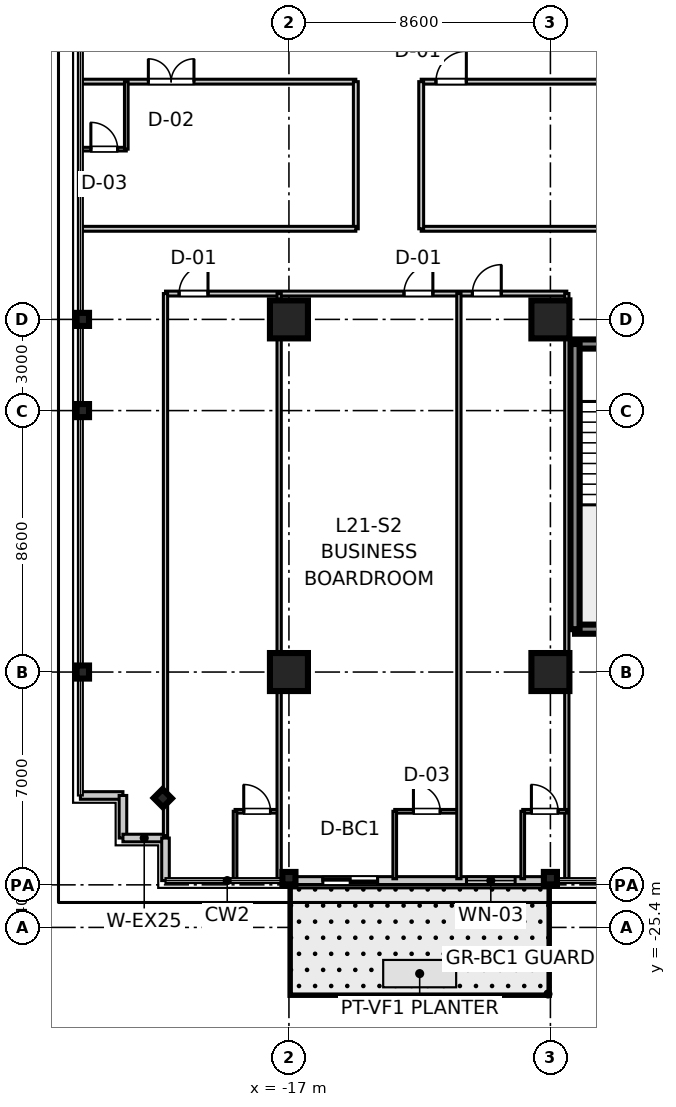
"""IFC4 building model, lengths in metres.
Left out: names, types, materials, properties, quantities, classifications, styles, units other than length and angle.
Written with IfcOpenShell. Run it as: python <this file> out.ifc"""

import sys

from ifc_helpers import new_model, si_unit, direction, frame, frame_2d, origin, origin_2d, place, context, subcontext, project, spatial, rectangle, i_section, extrude, source, transform, mapped, element, fill, save


model = new_model("IFC4")
c1 = context("Model", 3, precision=1e-05, world=origin(), true_north=direction((0.0, 1.0)))
c2 = subcontext(c1, "Body", "Model", "MODEL_VIEW")
j1 = project(units=[si_unit("LENGTHUNIT", "METRE"), si_unit("PLANEANGLEUNIT", "RADIAN")], contexts=[c1])
p1 = place(None, origin())
s1 = spatial("IfcSite", under=j1, at=p1, CompositionType="ELEMENT")
p2 = place(p1, origin())
s2 = spatial("IfcBuilding", under=s1, at=p2, CompositionType="ELEMENT")
p3 = place(p2, frame((0.0, 0.0, 88.3)))
s3 = spatial("IfcBuildingStorey", under=s2, at=p3, CompositionType="ELEMENT", Elevation=88.3)
m1 = source(origin(), c2, "Body", "SweptSolid", [
    extrude(rectangle(XDim=1.25, YDim=1.25, at=origin_2d()), origin(), (0.0, 0.0, 1.0), 3.605),
])
for number, where, z_axis, x_axis in (
    (1, (-17.0, -17.0, 0.0), (0.0, 0.0, 1.0), (1.0, 0.0, 0.0)),
    (2, (-17.0, -5.4, 0.0), (0.0, 0.0, 1.0), (1.0, 0.0, 0.0)),
    (3, (-8.4, -17.0, 0.0), (0.0, 0.0, 1.0), (1.0, 0.0, 0.0)),
    (4, (-8.4, -5.4, 0.0), (0.0, 0.0, 1.0), (1.0, 0.0, 0.0)),
):
    element("IfcColumn", number, at=place(p3, frame(where, z_axis=z_axis, x_axis=x_axis)), inside=s3, PredefinedType="COLUMN", context=c2, shape_type="MappedRepresentation", body=[
        mapped(m1, transform((0.0, 0.0, 0.0), scale=1.0)),
    ])
m2 = source(origin(), c2, "Body", "SweptSolid", [
    extrude(i_section(OverallWidth=0.409, OverallDepth=0.43, WebThickness=0.021, FlangeThickness=0.034, at=origin_2d()), origin(), (0.0, 0.0, 1.0), 3.605),
])
for number, where, z_axis, x_axis in (
    (5, (-23.78, -17.0, 0.0), (0.0, 0.0, 1.0), (1.0, 0.0, 0.0)),
    (6, (-23.78, -8.4, 0.0), (0.0, 0.0, 1.0), (1.0, 0.0, 0.0)),
    (7, (-23.78, -5.4, 0.0), (0.0, 0.0, 1.0), (1.0, 0.0, 0.0)),
    (8, (-17.0, -23.78, 0.0), (0.0, 0.0, 1.0), (0.0, 1.0, 0.0)),
    (9, (-8.4, -23.78, 0.0), (0.0, 0.0, 1.0), (0.0, 1.0, 0.0)),
    (10, (-21.15, -21.15, 0.0), (0.0, 0.0, 1.0), (0.707, 0.707, 0.0)),
):
    element("IfcColumn", number, at=place(p3, frame(where, z_axis=z_axis, x_axis=x_axis)), inside=s3, PredefinedType="COLUMN", context=c2, shape_type="MappedRepresentation", body=[
        mapped(m2, transform((0.0, 0.0, 0.0), scale=1.0)),
    ])
m3 = source(origin(), c2, "Body", "SweptSolid", [
    extrude(rectangle(XDim=3.98, YDim=0.3, at=frame_2d((1.99, 0.0))), origin(), (0.0, 0.0, 1.0), 3.38),
])
p4 = place(p3, frame((-7.59, -15.59, 0.0), z_axis=(0.0, 0.0, 1.0), x_axis=(1.0, 0.0, 0.0)))
e11 = element("IfcWall", 11, at=p4, inside=s3, PredefinedType="SHEAR", context=c2, shape_type="MappedRepresentation", body=[
    mapped(m3, transform((0.0, 0.0, 0.0), scale=1.0)),
])
p5 = place(p3, frame((-7.59, -6.21, 0.0), z_axis=(0.0, 0.0, 1.0), x_axis=(1.0, 0.0, 0.0)))
e12 = element("IfcWall", 12, at=p5, inside=s3, PredefinedType="SHEAR", context=c2, shape_type="MappedRepresentation", body=[
    mapped(m3, transform((0.0, 0.0, 0.0), scale=1.0)),
])
p6 = place(p5, frame((1.44, 0.0, 0.0)))
e13 = element("IfcOpeningElement", 13, at=p6, cuts=e12, PredefinedType="OPENING", context=c2, shape_type="SweptSolid", body=[
    extrude(rectangle(XDim=1.1, YDim=2.15, at=frame_2d((0.55, 1.075))), frame((0.0, 0.16, 0.0), z_axis=(0.0, -1.0, 0.0), x_axis=(1.0, 0.0, 0.0)), (0.0, 0.0, 1.0), 0.32),
])
m4 = source(origin(), c2, "Body", "SweptSolid", [
    extrude(rectangle(XDim=9.38, YDim=0.3, at=frame_2d((4.69, 0.0))), origin(), (0.0, 0.0, 1.0), 3.38),
])
p7 = place(p3, frame((-7.59, -15.59, 0.0), z_axis=(0.0, 0.0, 1.0), x_axis=(0.0, 1.0, 0.0)))
e14 = element("IfcWall", 14, at=p7, inside=s3, PredefinedType="SHEAR", context=c2, shape_type="MappedRepresentation", body=[
    mapped(m4, transform((0.0, 0.0, 0.0), scale=1.0)),
])
m5 = source(origin(), c2, "Body", "SweptSolid", [
    extrude(rectangle(XDim=1.4, YDim=0.25, at=frame_2d((0.7, 0.0))), origin(), (0.0, 0.0, 1.0), 3.38),
])
p8 = place(p3, frame((-23.86, -21.06, 0.0), z_axis=(0.0, 0.0, 1.0), x_axis=(1.0, 0.0, 0.0)))
e15 = element("IfcWall", 15, at=p8, inside=s3, PredefinedType="STANDARD", context=c2, shape_type="MappedRepresentation", body=[
    mapped(m5, transform((0.0, 0.0, 0.0), scale=1.0)),
])
m6 = source(origin(), c2, "Body", "SweptSolid", [
    extrude(rectangle(XDim=1.4, YDim=0.25, at=frame_2d((0.7, 0.0))), origin(), (0.0, 0.0, 1.0), 3.38),
])
for number, where, z_axis, x_axis in (
    (16, (-22.46, -22.46, 0.0), (0.0, 0.0, 1.0), (0.0, 1.0, 0.0)),
    (17, (-22.46, -22.46, 0.0), (0.0, 0.0, 1.0), (1.0, 0.0, 0.0)),
):
    element("IfcWall", number, at=place(p3, frame(where, z_axis=z_axis, x_axis=x_axis)), inside=s3, PredefinedType="STANDARD", context=c2, shape_type="MappedRepresentation", body=[
        mapped(m6, transform((0.0, 0.0, 0.0), scale=1.0)),
    ])
p9 = place(p3, frame((-21.06, -23.86, 0.0), z_axis=(0.0, 0.0, 1.0), x_axis=(0.0, 1.0, 0.0)))
e18 = element("IfcWall", 18, at=p9, inside=s3, PredefinedType="STANDARD", context=c2, shape_type="MappedRepresentation", body=[
    mapped(m5, transform((0.0, 0.0, 0.0), scale=1.0)),
])
m7 = source(origin(), c2, "Body", "SweptSolid", [
    extrude(rectangle(XDim=8.6, YDim=0.26, at=frame_2d((4.3, 0.0))), origin(), (0.0, 0.0, 1.0), 2.86),
])
p10 = place(p3, frame((-17.0, -23.86, 0.0), z_axis=(0.0, 0.0, 1.0), x_axis=(1.0, 0.0, 0.0)))
e19 = element("IfcWall", 19, at=p10, inside=s3, PredefinedType="STANDARD", context=c2, shape_type="MappedRepresentation", body=[
    mapped(m7, transform((0.0, 0.0, 0.0), scale=1.0)),
])
p11 = place(p10, frame((1.115, 0.0, 0.0)))
e20 = element("IfcOpeningElement", 20, at=p11, cuts=e19, PredefinedType="OPENING", context=c2, shape_type="SweptSolid", body=[
    extrude(rectangle(XDim=1.8, YDim=2.25, at=frame_2d((0.9, 1.125))), frame((0.0, 0.14, 0.0), z_axis=(0.0, -1.0, 0.0), x_axis=(1.0, 0.0, 0.0)), (0.0, 0.0, 1.0), 0.28),
])
p12 = place(p10, frame((5.84, 0.0, 0.85)))
e21 = element("IfcOpeningElement", 21, at=p12, cuts=e19, PredefinedType="OPENING", context=c2, shape_type="SweptSolid", body=[
    extrude(rectangle(XDim=1.6, YDim=1.8, at=frame_2d((0.8, 0.9))), frame((0.0, 0.14, 0.0), z_axis=(0.0, -1.0, 0.0), x_axis=(1.0, 0.0, 0.0)), (0.0, 0.0, 1.0), 0.28),
])
m8 = source(origin(), c2, "Body", "SweptSolid", [
    extrude(rectangle(XDim=13.2, YDim=0.16, at=frame_2d((6.6, 0.0))), origin(), (0.0, 0.0, 1.0), 2.72),
])
p13 = place(p3, frame((-21.06, -4.55, 0.0), z_axis=(0.0, 0.0, 1.0), x_axis=(1.0, 0.0, 0.0)))
e22 = element("IfcWall", 22, at=p13, inside=s3, PredefinedType="PARTITIONING", context=c2, shape_type="MappedRepresentation", body=[
    mapped(m8, transform((0.0, 0.0, 0.0), scale=1.0)),
])
p14 = place(p13, frame((0.448, 0.0, 0.0)))
e23 = element("IfcOpeningElement", 23, at=p14, cuts=e22, PredefinedType="OPENING", context=c2, shape_type="SweptSolid", body=[
    extrude(rectangle(XDim=0.95, YDim=2.1, at=frame_2d((0.475, 1.05))), frame((0.0, 0.09, 0.0), z_axis=(0.0, -1.0, 0.0), x_axis=(1.0, 0.0, 0.0)), (0.0, 0.0, 1.0), 0.18),
])
p15 = place(p13, frame((7.844, 0.0, 0.0)))
e24 = element("IfcOpeningElement", 24, at=p15, cuts=e22, PredefinedType="OPENING", context=c2, shape_type="SweptSolid", body=[
    extrude(rectangle(XDim=0.95, YDim=2.1, at=frame_2d((0.475, 1.05))), frame((0.0, 0.09, 0.0), z_axis=(0.0, -1.0, 0.0), x_axis=(1.0, 0.0, 0.0)), (0.0, 0.0, 1.0), 0.18),
])
p16 = place(p13, frame((10.094, 0.0, 0.0)))
e25 = element("IfcOpeningElement", 25, at=p16, cuts=e22, PredefinedType="OPENING", context=c2, shape_type="SweptSolid", body=[
    extrude(rectangle(XDim=0.95, YDim=2.1, at=frame_2d((0.475, 1.05))), frame((0.0, 0.09, 0.0), z_axis=(0.0, -1.0, 0.0), x_axis=(1.0, 0.0, 0.0)), (0.0, 0.0, 1.0), 0.18),
])
m9 = source(origin(), c2, "Body", "SweptSolid", [
    extrude(rectangle(XDim=17.83, YDim=0.14, at=frame_2d((8.915, 0.0))), origin(), (0.0, 0.0, 1.0), 2.72),
])
p17 = place(p3, frame((-21.06, -22.38, 0.0), z_axis=(0.0, 0.0, 1.0), x_axis=(0.0, 1.0, 0.0)))
e26 = element("IfcWall", 26, at=p17, inside=s3, PredefinedType="PARTITIONING", context=c2, shape_type="MappedRepresentation", body=[
    mapped(m9, transform((0.0, 0.0, 0.0), scale=1.0)),
])
m10 = source(origin(), c2, "Body", "SweptSolid", [
    extrude(rectangle(XDim=19.25, YDim=0.14, at=frame_2d((9.625, 0.0))), origin(), (0.0, 0.0, 1.0), 2.72),
])
p18 = place(p3, frame((-7.86, -23.8, 0.0), z_axis=(0.0, 0.0, 1.0), x_axis=(0.0, 1.0, 0.0)))
e27 = element("IfcWall", 27, at=p18, inside=s3, PredefinedType="PARTITIONING", context=c2, shape_type="MappedRepresentation", body=[
    mapped(m10, transform((0.0, 0.0, 0.0), scale=1.0)),
])
m11 = source(origin(), c2, "Body", "SweptSolid", [
    extrude(rectangle(XDim=1.45, YDim=0.12, at=frame_2d((0.725, 0.0))), origin(), (0.0, 0.0, 1.0), 2.72),
])
p19 = place(p3, frame((-18.772, -21.58, 0.0), z_axis=(0.0, 0.0, 1.0), x_axis=(1.0, 0.0, 0.0)))
e28 = element("IfcWall", 28, at=p19, inside=s3, PredefinedType="PARTITIONING", context=c2, shape_type="MappedRepresentation", body=[
    mapped(m11, transform((0.0, 0.0, 0.0), scale=1.0)),
])
p20 = place(p19, frame((0.285, 0.0, 0.0)))
e29 = element("IfcOpeningElement", 29, at=p20, cuts=e28, PredefinedType="OPENING", context=c2, shape_type="SweptSolid", body=[
    extrude(rectangle(XDim=0.88, YDim=2.1, at=frame_2d((0.44, 1.05))), frame((0.0, 0.07, 0.0), z_axis=(0.0, -1.0, 0.0), x_axis=(1.0, 0.0, 0.0)), (0.0, 0.0, 1.0), 0.14),
])
m12 = source(origin(), c2, "Body", "SweptSolid", [
    extrude(rectangle(XDim=2.22, YDim=0.12, at=frame_2d((1.11, 0.0))), origin(), (0.0, 0.0, 1.0), 2.72),
])
p21 = place(p3, frame((-18.772, -23.8, 0.0), z_axis=(0.0, 0.0, 1.0), x_axis=(0.0, 1.0, 0.0)))
e30 = element("IfcWall", 30, at=p21, inside=s3, PredefinedType="PARTITIONING", context=c2, shape_type="MappedRepresentation", body=[
    mapped(m12, transform((0.0, 0.0, 0.0), scale=1.0)),
])
p22 = place(p3, frame((-17.322, -23.8, 0.0), z_axis=(0.0, 0.0, 1.0), x_axis=(0.0, 1.0, 0.0)))
e31 = element("IfcWall", 31, at=p22, inside=s3, PredefinedType="PARTITIONING", context=c2, shape_type="MappedRepresentation", body=[
    mapped(m10, transform((0.0, 0.0, 0.0), scale=1.0)),
])
m13 = source(origin(), c2, "Body", "SweptSolid", [
    extrude(rectangle(XDim=2.11, YDim=0.12, at=frame_2d((1.055, 0.0))), origin(), (0.0, 0.0, 1.0), 2.72),
])
p23 = place(p3, frame((-13.52, -21.58, 0.0), z_axis=(0.0, 0.0, 1.0), x_axis=(1.0, 0.0, 0.0)))
e32 = element("IfcWall", 32, at=p23, inside=s3, PredefinedType="PARTITIONING", context=c2, shape_type="MappedRepresentation", body=[
    mapped(m13, transform((0.0, 0.0, 0.0), scale=1.0)),
])
p24 = place(p23, frame((0.615, 0.0, 0.0)))
e33 = element("IfcOpeningElement", 33, at=p24, cuts=e32, PredefinedType="OPENING", context=c2, shape_type="SweptSolid", body=[
    extrude(rectangle(XDim=0.88, YDim=2.1, at=frame_2d((0.44, 1.05))), frame((0.0, 0.07, 0.0), z_axis=(0.0, -1.0, 0.0), x_axis=(1.0, 0.0, 0.0)), (0.0, 0.0, 1.0), 0.14),
])
p25 = place(p3, frame((-13.52, -23.8, 0.0), z_axis=(0.0, 0.0, 1.0), x_axis=(0.0, 1.0, 0.0)))
e34 = element("IfcWall", 34, at=p25, inside=s3, PredefinedType="PARTITIONING", context=c2, shape_type="MappedRepresentation", body=[
    mapped(m12, transform((0.0, 0.0, 0.0), scale=1.0)),
])
p26 = place(p3, frame((-11.41, -23.8, 0.0), z_axis=(0.0, 0.0, 1.0), x_axis=(0.0, 1.0, 0.0)))
e35 = element("IfcWall", 35, at=p26, inside=s3, PredefinedType="PARTITIONING", context=c2, shape_type="MappedRepresentation", body=[
    mapped(m10, transform((0.0, 0.0, 0.0), scale=1.0)),
])
p27 = place(p3, frame((-9.31, -21.58, 0.0), z_axis=(0.0, 0.0, 1.0), x_axis=(1.0, 0.0, 0.0)))
e36 = element("IfcWall", 36, at=p27, inside=s3, PredefinedType="PARTITIONING", context=c2, shape_type="MappedRepresentation", body=[
    mapped(m11, transform((0.0, 0.0, 0.0), scale=1.0)),
])
p28 = place(p27, frame((0.285, 0.0, 0.0)))
e37 = element("IfcOpeningElement", 37, at=p28, cuts=e36, PredefinedType="OPENING", context=c2, shape_type="SweptSolid", body=[
    extrude(rectangle(XDim=0.88, YDim=2.1, at=frame_2d((0.44, 1.05))), frame((0.0, 0.07, 0.0), z_axis=(0.0, -1.0, 0.0), x_axis=(1.0, 0.0, 0.0)), (0.0, 0.0, 1.0), 0.14),
])
p29 = place(p3, frame((-9.31, -23.8, 0.0), z_axis=(0.0, 0.0, 1.0), x_axis=(0.0, 1.0, 0.0)))
e38 = element("IfcWall", 38, at=p29, inside=s3, PredefinedType="PARTITIONING", context=c2, shape_type="MappedRepresentation", body=[
    mapped(m12, transform((0.0, 0.0, 0.0), scale=1.0)),
])
m14 = source(origin(), c2, "Body", "SweptSolid", [
    extrude(rectangle(XDim=9.0, YDim=0.16, at=frame_2d((4.5, 0.0))), origin(), (0.0, 0.0, 1.0), 2.72),
])
p30 = place(p3, frame((-23.8, 2.42, 0.0), z_axis=(0.0, 0.0, 1.0), x_axis=(1.0, 0.0, 0.0)))
e39 = element("IfcWall", 39, at=p30, inside=s3, PredefinedType="PARTITIONING", context=c2, shape_type="MappedRepresentation", body=[
    mapped(m14, transform((0.0, 0.0, 0.0), scale=1.0)),
])
p31 = place(p30, frame((2.176, 0.0, 0.0)))
e40 = element("IfcOpeningElement", 40, at=p31, cuts=e39, PredefinedType="OPENING", context=c2, shape_type="SweptSolid", body=[
    extrude(rectangle(XDim=1.5, YDim=2.15, at=frame_2d((0.75, 1.075))), frame((0.0, 0.09, 0.0), z_axis=(0.0, -1.0, 0.0), x_axis=(1.0, 0.0, 0.0)), (0.0, 0.0, 1.0), 0.18),
])
m15 = source(origin(), c2, "Body", "SweptSolid", [
    extrude(rectangle(XDim=4.84, YDim=0.16, at=frame_2d((2.42, 0.0))), origin(), (0.0, 0.0, 1.0), 2.72),
])
p32 = place(p3, frame((-14.8, -2.42, 0.0), z_axis=(0.0, 0.0, 1.0), x_axis=(0.0, 1.0, 0.0)))
e41 = element("IfcWall", 41, at=p32, inside=s3, PredefinedType="PARTITIONING", context=c2, shape_type="MappedRepresentation", body=[
    mapped(m15, transform((0.0, 0.0, 0.0), scale=1.0)),
])
p33 = place(p3, frame((-23.8, -2.42, 0.0), z_axis=(0.0, 0.0, 1.0), x_axis=(1.0, 0.0, 0.0)))
e42 = element("IfcWall", 42, at=p33, inside=s3, PredefinedType="PARTITIONING", context=c2, shape_type="MappedRepresentation", body=[
    mapped(m14, transform((0.0, 0.0, 0.0), scale=1.0)),
])
p34 = place(p3, frame((-23.8, 0.2, 0.0), z_axis=(0.0, 0.0, 1.0), x_axis=(1.0, 0.0, 0.0)))
e43 = element("IfcWall", 43, at=p34, inside=s3, PredefinedType="PARTITIONING", context=c2, shape_type="MappedRepresentation", body=[
    mapped(m11, transform((0.0, 0.0, 0.0), scale=1.0)),
])
p35 = place(p34, frame((0.285, 0.0, 0.0)))
e44 = element("IfcOpeningElement", 44, at=p35, cuts=e43, PredefinedType="OPENING", context=c2, shape_type="SweptSolid", body=[
    extrude(rectangle(XDim=0.88, YDim=2.1, at=frame_2d((0.44, 1.05))), frame((0.0, 0.07, 0.0), z_axis=(0.0, -1.0, 0.0), x_axis=(1.0, 0.0, 0.0)), (0.0, 0.0, 1.0), 0.14),
])
p36 = place(p3, frame((-22.35, 0.2, 0.0), z_axis=(0.0, 0.0, 1.0), x_axis=(0.0, 1.0, 0.0)))
e45 = element("IfcWall", 45, at=p36, inside=s3, PredefinedType="PARTITIONING", context=c2, shape_type="MappedRepresentation", body=[
    mapped(m12, transform((0.0, 0.0, 0.0), scale=1.0)),
])
m16 = source(origin(), c2, "Body", "SweptSolid", [
    extrude(rectangle(XDim=6.6, YDim=0.16, at=frame_2d((3.3, 0.0))), origin(), (0.0, 0.0, 1.0), 2.72),
])
p37 = place(p3, frame((-12.65, -2.42, 0.0), z_axis=(0.0, 0.0, 1.0), x_axis=(1.0, 0.0, 0.0)))
e46 = element("IfcWall", 46, at=p37, inside=s3, PredefinedType="PARTITIONING", context=c2, shape_type="MappedRepresentation", body=[
    mapped(m16, transform((0.0, 0.0, 0.0), scale=1.0)),
])
p38 = place(p3, frame((-12.65, 2.42, 0.0), z_axis=(0.0, 0.0, 1.0), x_axis=(1.0, 0.0, 0.0)))
e47 = element("IfcWall", 47, at=p38, inside=s3, PredefinedType="PARTITIONING", context=c2, shape_type="MappedRepresentation", body=[
    mapped(m16, transform((0.0, 0.0, 0.0), scale=1.0)),
])
p39 = place(p38, frame((0.485, 0.0, 0.0)))
e48 = element("IfcOpeningElement", 48, at=p39, cuts=e47, PredefinedType="OPENING", context=c2, shape_type="SweptSolid", body=[
    extrude(rectangle(XDim=1.0, YDim=2.1, at=frame_2d((0.5, 1.05))), frame((0.0, 0.09, 0.0), z_axis=(0.0, -1.0, 0.0), x_axis=(1.0, 0.0, 0.0)), (0.0, 0.0, 1.0), 0.18),
])
p40 = place(p3, frame((-12.65, -2.42, 0.0), z_axis=(0.0, 0.0, 1.0), x_axis=(0.0, 1.0, 0.0)))
e49 = element("IfcWall", 49, at=p40, inside=s3, PredefinedType="PARTITIONING", context=c2, shape_type="MappedRepresentation", body=[
    mapped(m15, transform((0.0, 0.0, 0.0), scale=1.0)),
])
m17 = source(origin(), c2, "Body", "SweptSolid", [
    extrude(rectangle(XDim=0.88, YDim=2.1, at=frame_2d((0.44, 1.05))), frame((0.0, 0.025, 0.0), z_axis=(0.0, -1.0, 0.0), x_axis=(1.0, 0.0, 0.0)), (0.0, 0.0, 1.0), 0.05),
])
p41 = place(p20, frame((0.88, 0.0, 0.0), z_axis=(0.0, 0.0, 1.0), x_axis=(-1.0, 0.0, 0.0)))
e50 = element("IfcDoor", 50, at=p41, inside=s3, OperationType="SINGLE_SWING_LEFT", PredefinedType="DOOR", context=c2, shape_type="MappedRepresentation", body=[
    mapped(m17, transform((0.0, 0.0, 0.0), scale=1.0)),
])
fill(e29, e50)
m18 = source(origin(), c2, "Body", "SweptSolid", [
    extrude(rectangle(XDim=0.95, YDim=2.1, at=frame_2d((0.475, 1.05))), frame((0.0, 0.025, 0.0), z_axis=(0.0, -1.0, 0.0), x_axis=(1.0, 0.0, 0.0)), (0.0, 0.0, 1.0), 0.05),
])
p42 = place(p14, frame((0.95, 0.0, 0.0), z_axis=(0.0, 0.0, 1.0), x_axis=(-1.0, 0.0, 0.0)))
e51 = element("IfcDoor", 51, at=p42, inside=s3, OperationType="SINGLE_SWING_RIGHT", PredefinedType="DOOR", context=c2, shape_type="MappedRepresentation", body=[
    mapped(m18, transform((0.0, 0.0, 0.0), scale=1.0)),
])
fill(e23, e51)
p43 = place(p24, frame((0.88, 0.0, 0.0), z_axis=(0.0, 0.0, 1.0), x_axis=(-1.0, 0.0, 0.0)))
e52 = element("IfcDoor", 52, at=p43, inside=s3, OperationType="SINGLE_SWING_LEFT", PredefinedType="DOOR", context=c2, shape_type="MappedRepresentation", body=[
    mapped(m17, transform((0.0, 0.0, 0.0), scale=1.0)),
])
fill(e33, e52)
p44 = place(p15, frame((0.95, 0.0, 0.0), z_axis=(0.0, 0.0, 1.0), x_axis=(-1.0, 0.0, 0.0)))
e53 = element("IfcDoor", 53, at=p44, inside=s3, OperationType="SINGLE_SWING_RIGHT", PredefinedType="DOOR", context=c2, shape_type="MappedRepresentation", body=[
    mapped(m18, transform((0.0, 0.0, 0.0), scale=1.0)),
])
fill(e24, e53)
p45 = place(p28, frame((0.88, 0.0, 0.0), z_axis=(0.0, 0.0, 1.0), x_axis=(-1.0, 0.0, 0.0)))
e54 = element("IfcDoor", 54, at=p45, inside=s3, OperationType="SINGLE_SWING_LEFT", PredefinedType="DOOR", context=c2, shape_type="MappedRepresentation", body=[
    mapped(m17, transform((0.0, 0.0, 0.0), scale=1.0)),
])
fill(e37, e54)
p46 = place(p16, frame((0.95, 0.0, 0.0), z_axis=(0.0, 0.0, 1.0), x_axis=(-1.0, 0.0, 0.0)))
e55 = element("IfcDoor", 55, at=p46, inside=s3, OperationType="SINGLE_SWING_RIGHT", PredefinedType="DOOR", context=c2, shape_type="MappedRepresentation", body=[
    mapped(m18, transform((0.0, 0.0, 0.0), scale=1.0)),
])
fill(e25, e55)
p47 = place(p35, origin())
e56 = element("IfcDoor", 56, at=p47, inside=s3, OperationType="SINGLE_SWING_LEFT", PredefinedType="DOOR", context=c2, shape_type="MappedRepresentation", body=[
    mapped(m17, transform((0.0, 0.0, 0.0), scale=1.0)),
])
fill(e44, e56)
m19 = source(origin(), c2, "Body", "SweptSolid", [
    extrude(rectangle(XDim=1.5, YDim=2.15, at=frame_2d((0.75, 1.075))), frame((0.0, 0.025, 0.0), z_axis=(0.0, -1.0, 0.0), x_axis=(1.0, 0.0, 0.0)), (0.0, 0.0, 1.0), 0.05),
])
p48 = place(p31, origin())
e57 = element("IfcDoor", 57, at=p48, inside=s3, OperationType="DOUBLE_DOOR_SINGLE_SWING", PredefinedType="DOOR", context=c2, shape_type="MappedRepresentation", body=[
    mapped(m19, transform((0.0, 0.0, 0.0), scale=1.0)),
])
fill(e40, e57)
m20 = source(origin(), c2, "Body", "SweptSolid", [
    extrude(rectangle(XDim=1.0, YDim=2.1, at=frame_2d((0.5, 1.05))), frame((0.0, 0.025, 0.0), z_axis=(0.0, -1.0, 0.0), x_axis=(1.0, 0.0, 0.0)), (0.0, 0.0, 1.0), 0.05),
])
p49 = place(p39, frame((1.0, 0.0, 0.0), z_axis=(0.0, 0.0, 1.0), x_axis=(-1.0, 0.0, 0.0)))
e58 = element("IfcDoor", 58, at=p49, inside=s3, OperationType="SINGLE_SWING_RIGHT", PredefinedType="DOOR", context=c2, shape_type="MappedRepresentation", body=[
    mapped(m20, transform((0.0, 0.0, 0.0), scale=1.0)),
])
fill(e48, e58)
m21 = source(origin(), c2, "Body", "SweptSolid", [
    extrude(rectangle(XDim=1.8, YDim=2.25, at=frame_2d((0.9, 1.125))), frame((0.0, 0.025, 0.0), z_axis=(0.0, -1.0, 0.0), x_axis=(1.0, 0.0, 0.0)), (0.0, 0.0, 1.0), 0.05),
])
p50 = place(p11, frame((1.8, 0.0, 0.0), z_axis=(0.0, 0.0, 1.0), x_axis=(-1.0, 0.0, 0.0)))
e59 = element("IfcDoor", 59, at=p50, inside=s3, OperationType="DOUBLE_DOOR_SLIDING", PredefinedType="DOOR", context=c2, shape_type="MappedRepresentation", body=[
    mapped(m21, transform((0.0, 0.0, 0.0), scale=1.0)),
])
fill(e20, e59)
m22 = source(origin(), c2, "Body", "SweptSolid", [
    extrude(rectangle(XDim=1.6, YDim=1.8, at=frame_2d((0.8, 0.9))), frame((0.0, 0.03, 0.0), z_axis=(0.0, -1.0, 0.0), x_axis=(1.0, 0.0, 0.0)), (0.0, 0.0, 1.0), 0.06),
])
p51 = place(p12, origin())
e60 = element("IfcWindow", 60, at=p51, inside=s3, PartitioningType="SINGLE_PANEL", PredefinedType="WINDOW", context=c2, shape_type="MappedRepresentation", body=[
    mapped(m22, transform((0.0, 0.0, 0.0), scale=1.0)),
])
fill(e21, e60)
save(model, sys.argv[1])
